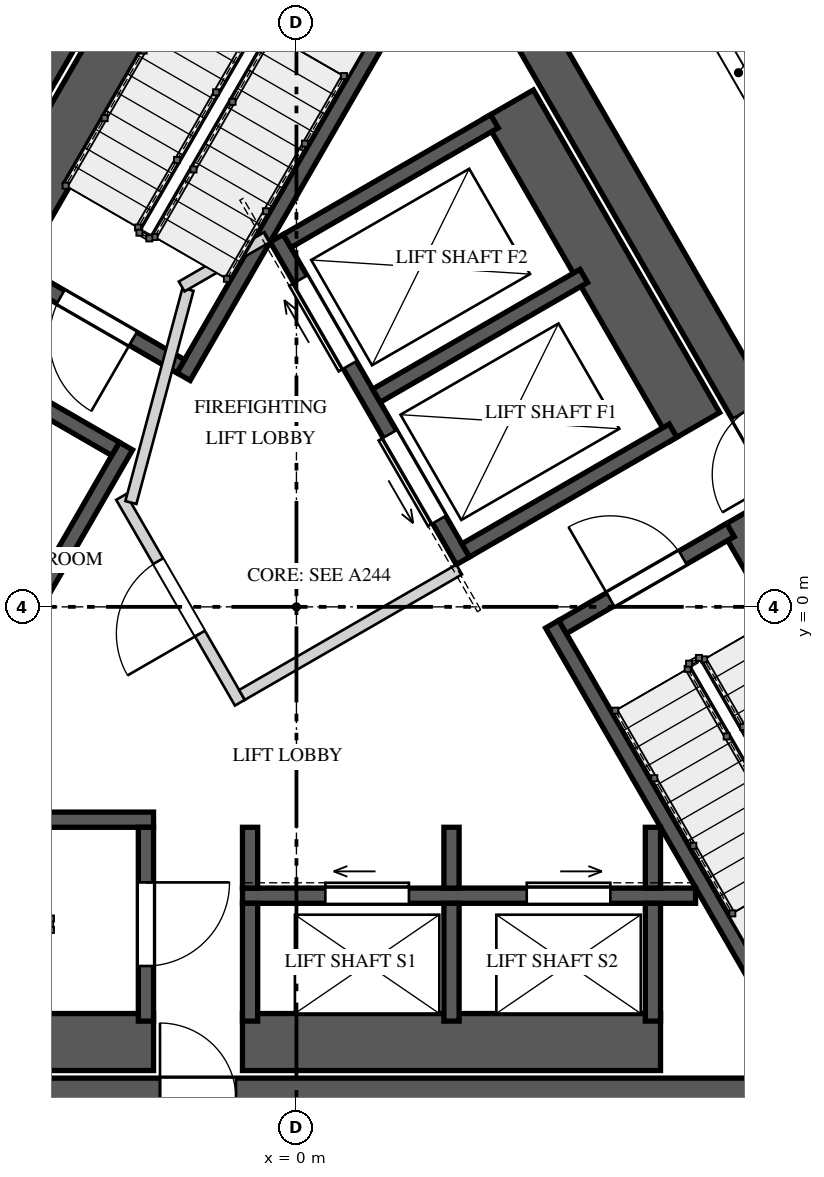
"""IFC4 building model, lengths in metres.
Left out: names, types, materials, properties, quantities, classifications, styles, units other than length and angle.
Written with IfcOpenShell. Run it as: python <this file> out.ifc"""

import sys

from ifc_helpers import new_model, si_unit, direction, frame, frame_2d, origin, place, context, subcontext, project, spatial, polyline, rectangle, outline, extrude, element, fill, save


model = new_model("IFC4")
c1 = context("Model", 3, precision=1e-05, world=origin(), true_north=direction((0.0, 1.0)))
c2 = subcontext(c1, "Body", "Model", "MODEL_VIEW")
j1 = project(units=[si_unit("LENGTHUNIT", "METRE"), si_unit("PLANEANGLEUNIT", "RADIAN")], contexts=[c1])
p1 = place(None, origin())
s1 = spatial("IfcSite", under=j1, at=p1, CompositionType="ELEMENT")
p2 = place(p1, origin())
s2 = spatial("IfcBuilding", under=s1, at=p2, CompositionType="ELEMENT")
p3 = place(p2, frame((0.0, 0.0, 348.4)))
s3 = spatial("IfcBuildingStorey", under=s2, at=p3, CompositionType="ELEMENT", Elevation=348.4)
p4 = place(p3, frame((-1.285, 10.725, 0.0), z_axis=(0.0, 0.0, 1.0), x_axis=(-0.499994590896, -0.86602852671, 0.0)))
e1 = element("IfcWall", 1, at=p4, inside=s3, PredefinedType="SHEAR", context=c2, shape_type="SweptSolid", body=[
    extrude(rectangle(XDim=17.292, YDim=0.55, at=frame_2d((8.646, 0.0))), origin(), (0.0, 0.0, 1.0), 4.0),
])
p5 = place(p4, frame((6.851, 0.0, 0.0)))
e2 = element("IfcOpeningElement", 2, at=p5, cuts=e1, PredefinedType="OPENING", context=c2, shape_type="SweptSolid", body=[
    extrude(rectangle(XDim=1.0, YDim=2.4, at=frame_2d((0.5, 1.2))), frame((0.0, 0.285, 0.0), z_axis=(0.0, -1.0, 0.0), x_axis=(1.0, 0.0, 0.0)), (0.0, 0.0, 1.0), 0.57),
])
p6 = place(p4, frame((15.089, 0.0, 0.0)))
e3 = element("IfcOpeningElement", 3, at=p6, cuts=e1, PredefinedType="OPENING", context=c2, shape_type="SweptSolid", body=[
    extrude(rectangle(XDim=0.8, YDim=2.1, at=frame_2d((0.4, 1.05))), frame((0.0, 0.285, 0.0), z_axis=(0.0, -1.0, 0.0), x_axis=(1.0, 0.0, 0.0)), (0.0, 0.0, 1.0), 0.57),
])
p7 = place(p3, frame((-8.646, -6.475, 0.0), z_axis=(0.0, 0.0, 1.0), x_axis=(1.0, 0.0, 0.0)))
e4 = element("IfcWall", 4, at=p7, inside=s3, PredefinedType="SHEAR", context=c2, shape_type="SweptSolid", body=[
    extrude(rectangle(XDim=17.292, YDim=0.55, at=frame_2d((8.646, 0.0))), origin(), (0.0, 0.0, 1.0), 4.0),
])
p8 = place(p7, frame((6.851, 0.0, 0.0)))
e5 = element("IfcOpeningElement", 5, at=p8, cuts=e4, PredefinedType="OPENING", context=c2, shape_type="SweptSolid", body=[
    extrude(rectangle(XDim=1.0, YDim=2.4, at=frame_2d((0.5, 1.2))), frame((0.0, 0.285, 0.0), z_axis=(0.0, -1.0, 0.0), x_axis=(1.0, 0.0, 0.0)), (0.0, 0.0, 1.0), 0.57),
])
p9 = place(p7, frame((15.089, 0.0, 0.0)))
e6 = element("IfcOpeningElement", 6, at=p9, cuts=e4, PredefinedType="OPENING", context=c2, shape_type="SweptSolid", body=[
    extrude(rectangle(XDim=0.8, YDim=2.1, at=frame_2d((0.4, 1.05))), frame((0.0, 0.285, 0.0), z_axis=(0.0, -1.0, 0.0), x_axis=(1.0, 0.0, 0.0)), (0.0, 0.0, 1.0), 0.57),
])
p10 = place(p3, frame((9.93, -4.25, 0.0), z_axis=(0.0, 0.0, 1.0), x_axis=(-0.499994590896, 0.86602852671, 0.0)))
e7 = element("IfcWall", 7, at=p10, inside=s3, PredefinedType="SHEAR", context=c2, shape_type="SweptSolid", body=[
    extrude(rectangle(XDim=17.292, YDim=0.55, at=frame_2d((8.646, 0.0))), origin(), (0.0, 0.0, 1.0), 4.0),
])
p11 = place(p10, frame((6.921, 0.0, 0.0)))
e8 = element("IfcOpeningElement", 8, at=p11, cuts=e7, PredefinedType="OPENING", context=c2, shape_type="SweptSolid", body=[
    extrude(rectangle(XDim=1.0, YDim=2.4, at=frame_2d((0.5, 1.2))), frame((0.0, 0.285, 0.0), z_axis=(0.0, -1.0, 0.0), x_axis=(1.0, 0.0, 0.0)), (0.0, 0.0, 1.0), 0.57),
])
p12 = place(p3, frame((-0.918, 9.86, 0.0), z_axis=(0.0, 0.0, 1.0), x_axis=(-0.500026960575, -0.86600983753, 0.0)))
e9 = element("IfcWall", 9, at=p12, inside=s3, PredefinedType="SOLIDWALL", context=c2, shape_type="SweptSolid", body=[
    extrude(rectangle(XDim=6.2, YDim=0.75, at=frame_2d((3.1, 0.0))), origin(), (0.0, 0.0, 1.0), 3.65),
])
p13 = place(p3, frame((1.615, 8.397, 0.0), z_axis=(0.0, 0.0, 1.0), x_axis=(-0.500009909098, -0.866019682689, 0.0)))
e10 = element("IfcWall", 10, at=p13, inside=s3, PredefinedType="SOLIDWALL", context=c2, shape_type="SweptSolid", body=[
    extrude(rectangle(XDim=6.2, YDim=0.2, at=frame_2d((3.1, 0.0))), origin(), (0.0, 0.0, 1.0), 3.65),
])
p14 = place(p3, frame((-1.521, 3.165, 0.0), z_axis=(0.0, 0.0, 1.0), x_axis=(-0.866030925526, 0.499990435942, 0.0)))
e11 = element("IfcWall", 11, at=p14, inside=s3, PredefinedType="SOLIDWALL", context=c2, shape_type="SweptSolid", body=[
    extrude(rectangle(XDim=2.55, YDim=0.2, at=frame_2d((1.275, 0.0))), origin(), (0.0, 0.0, 1.0), 3.65),
])
p15 = place(p14, frame((0.725, 0.0, 0.0)))
e12 = element("IfcOpeningElement", 12, at=p15, cuts=e11, PredefinedType="OPENING", context=c2, shape_type="SweptSolid", body=[
    extrude(rectangle(XDim=1.1, YDim=2.4, at=frame_2d((0.55, 1.2))), frame((0.0, 0.11, 0.0), z_axis=(0.0, -1.0, 0.0), x_axis=(1.0, 0.0, 0.0)), (0.0, 0.0, 1.0), 0.22),
])
p16 = place(p3, frame((-8.08, -5.725, 0.0), z_axis=(0.0, 0.0, 1.0), x_axis=(1.0, 0.0, 0.0)))
e13 = element("IfcWall", 13, at=p16, inside=s3, PredefinedType="SOLIDWALL", context=c2, shape_type="SweptSolid", body=[
    extrude(rectangle(XDim=6.2, YDim=0.75, at=frame_2d((3.1, 0.0))), origin(), (0.0, 0.0, 1.0), 3.65),
])
p17 = place(p3, frame((-8.08, -2.8, 0.0), z_axis=(0.0, 0.0, 1.0), x_axis=(1.0, 0.0, 0.0)))
e14 = element("IfcWall", 14, at=p17, inside=s3, PredefinedType="SOLIDWALL", context=c2, shape_type="SweptSolid", body=[
    extrude(rectangle(XDim=6.2, YDim=0.2, at=frame_2d((3.1, 0.0))), origin(), (0.0, 0.0, 1.0), 3.65),
])
p18 = place(p3, frame((-1.98, -2.9, 0.0), z_axis=(0.0, 0.0, 1.0), x_axis=(0.0, -1.0, 0.0)))
e15 = element("IfcWall", 15, at=p18, inside=s3, PredefinedType="SOLIDWALL", context=c2, shape_type="SweptSolid", body=[
    extrude(rectangle(XDim=2.55, YDim=0.2, at=frame_2d((1.275, 0.0))), origin(), (0.0, 0.0, 1.0), 3.65),
])
p19 = place(p18, frame((0.725, 0.0, 0.0)))
e16 = element("IfcOpeningElement", 16, at=p19, cuts=e15, PredefinedType="OPENING", context=c2, shape_type="SweptSolid", body=[
    extrude(rectangle(XDim=1.1, YDim=2.4, at=frame_2d((0.55, 1.2))), frame((0.0, 0.11, 0.0), z_axis=(0.0, -1.0, 0.0), x_axis=(1.0, 0.0, 0.0)), (0.0, 0.0, 1.0), 0.22),
])
p20 = place(p3, frame((8.998, -4.135, 0.0), z_axis=(0.0, 0.0, 1.0), x_axis=(-0.500009909098, 0.866019682689, 0.0)))
e17 = element("IfcWall", 17, at=p20, inside=s3, PredefinedType="SOLIDWALL", context=c2, shape_type="SweptSolid", body=[
    extrude(rectangle(XDim=6.2, YDim=0.75, at=frame_2d((3.1, 0.0))), origin(), (0.0, 0.0, 1.0), 3.65),
])
p21 = place(p3, frame((6.465, -5.597, 0.0), z_axis=(0.0, 0.0, 1.0), x_axis=(-0.49998037582, 0.866036733513, 0.0)))
e18 = element("IfcWall", 18, at=p21, inside=s3, PredefinedType="SOLIDWALL", context=c2, shape_type="SweptSolid", body=[
    extrude(rectangle(XDim=6.2, YDim=0.2, at=frame_2d((3.1, 0.0))), origin(), (0.0, 0.0, 1.0), 3.65),
])
p22 = place(p3, frame((3.501, -0.265, 0.0), z_axis=(0.0, 0.0, 1.0), x_axis=(0.866030925526, 0.499990435942, 0.0)))
e19 = element("IfcWall", 19, at=p22, inside=s3, PredefinedType="SOLIDWALL", context=c2, shape_type="SweptSolid", body=[
    extrude(rectangle(XDim=2.55, YDim=0.2, at=frame_2d((1.275, 0.0))), origin(), (0.0, 0.0, 1.0), 3.65),
])
p23 = place(p22, frame((0.725, 0.0, 0.0)))
e20 = element("IfcOpeningElement", 20, at=p23, cuts=e19, PredefinedType="OPENING", context=c2, shape_type="SweptSolid", body=[
    extrude(rectangle(XDim=1.1, YDim=2.4, at=frame_2d((0.55, 1.2))), frame((0.0, 0.11, 0.0), z_axis=(0.0, -1.0, 0.0), x_axis=(1.0, 0.0, 0.0)), (0.0, 0.0, 1.0), 0.22),
])
p24 = place(p3, frame((-4.993, -2.648, 0.0), z_axis=(0.0, 0.0, 1.0), x_axis=(0.499996545922, 0.866027397988, 0.0)))
e21 = element("IfcWall", 21, at=p24, inside=s3, PredefinedType="SOLIDWALL", context=c2, shape_type="SweptSolid", body=[
    extrude(rectangle(XDim=5.5, YDim=0.2, at=frame_2d((2.75, 0.0))), origin(), (0.0, 0.0, 1.0), 3.65),
])
p25 = place(p24, frame((2.275, 0.0, 0.0)))
e22 = element("IfcOpeningElement", 22, at=p25, cuts=e21, PredefinedType="OPENING", context=c2, shape_type="SweptSolid", body=[
    extrude(rectangle(XDim=0.95, YDim=2.4, at=frame_2d((0.475, 1.2))), frame((0.0, 0.11, 0.0), z_axis=(0.0, -1.0, 0.0), x_axis=(1.0, 0.0, 0.0)), (0.0, 0.0, 1.0), 0.22),
])
p26 = place(p3, frame((-2.38, 2.078, 0.0), z_axis=(0.0, 0.0, 1.0), x_axis=(-0.866061024631, 0.499938297808, 0.0)))
e23 = element("IfcWall", 23, at=p26, inside=s3, PredefinedType="SOLIDWALL", context=c2, shape_type="SweptSolid", body=[
    extrude(rectangle(XDim=2.35, YDim=0.2, at=frame_2d((1.175, 0.0))), origin(), (0.0, 0.0, 1.0), 3.65),
])
p27 = place(p3, frame((-0.71, -3.8, 0.0), z_axis=(0.0, 0.0, 1.0), x_axis=(1.0, 0.0, 0.0)))
e24 = element("IfcWall", 24, at=p27, inside=s3, PredefinedType="SOLIDWALL", context=c2, shape_type="SweptSolid", body=[
    extrude(rectangle(XDim=5.961, YDim=0.2, at=frame_2d((2.981, 0.0))), origin(), (0.0, 0.0, 1.0), 3.65),
])
p28 = place(p27, frame((1.09, 0.0, 0.0)))
e25 = element("IfcOpeningElement", 25, at=p28, cuts=e24, PredefinedType="OPENING", context=c2, shape_type="SweptSolid", body=[
    extrude(rectangle(XDim=1.1, YDim=2.1, at=frame_2d((0.55, 1.05))), frame((0.0, 0.11, 0.0), z_axis=(0.0, -1.0, 0.0), x_axis=(1.0, 0.0, 0.0)), (0.0, 0.0, 1.0), 0.22),
])
p29 = place(p27, frame((3.74, 0.0, 0.0)))
e26 = element("IfcOpeningElement", 26, at=p29, cuts=e24, PredefinedType="OPENING", context=c2, shape_type="SweptSolid", body=[
    extrude(rectangle(XDim=1.1, YDim=2.1, at=frame_2d((0.55, 1.05))), frame((0.0, 0.11, 0.0), z_axis=(0.0, -1.0, 0.0), x_axis=(1.0, 0.0, 0.0)), (0.0, 0.0, 1.0), 0.22),
])
p30 = place(p3, frame((-0.71, -5.725, 0.0), z_axis=(0.0, 0.0, 1.0), x_axis=(1.0, 0.0, 0.0)))
e27 = element("IfcWall", 27, at=p30, inside=s3, PredefinedType="SOLIDWALL", context=c2, shape_type="SweptSolid", body=[
    extrude(rectangle(XDim=5.5, YDim=0.75, at=frame_2d((2.75, 0.0))), origin(), (0.0, 0.0, 1.0), 3.65),
])
p31 = place(p3, frame((-0.61, -3.9, 0.0), z_axis=(0.0, 0.0, 1.0), x_axis=(0.0, -1.0, 0.0)))
e28 = element("IfcWall", 28, at=p31, inside=s3, PredefinedType="SOLIDWALL", context=c2, shape_type="SweptSolid", body=[
    extrude(rectangle(XDim=1.55, YDim=0.2, at=frame_2d((0.775, 0.0))), origin(), (0.0, 0.0, 1.0), 3.65),
])
p32 = place(p3, frame((-0.61, -2.9, 0.0), z_axis=(0.0, 0.0, 1.0), x_axis=(0.0, -1.0, 0.0)))
e29 = element("IfcWall", 29, at=p32, inside=s3, PredefinedType="SOLIDWALL", context=c2, shape_type="SweptSolid", body=[
    extrude(rectangle(XDim=0.8, YDim=0.2, at=frame_2d((0.4, 0.0))), origin(), (0.0, 0.0, 1.0), 3.65),
])
p33 = place(p3, frame((2.04, -3.9, 0.0), z_axis=(0.0, 0.0, 1.0), x_axis=(0.0, -1.0, 0.0)))
e30 = element("IfcWall", 30, at=p33, inside=s3, PredefinedType="SOLIDWALL", context=c2, shape_type="SweptSolid", body=[
    extrude(rectangle(XDim=1.55, YDim=0.2, at=frame_2d((0.775, 0.0))), origin(), (0.0, 0.0, 1.0), 3.65),
])
p34 = place(p3, frame((2.04, -2.9, 0.0), z_axis=(0.0, 0.0, 1.0), x_axis=(0.0, -1.0, 0.0)))
e31 = element("IfcWall", 31, at=p34, inside=s3, PredefinedType="SOLIDWALL", context=c2, shape_type="SweptSolid", body=[
    extrude(rectangle(XDim=0.8, YDim=0.2, at=frame_2d((0.4, 0.0))), origin(), (0.0, 0.0, 1.0), 3.65),
])
p35 = place(p3, frame((4.69, -3.9, 0.0), z_axis=(0.0, 0.0, 1.0), x_axis=(0.0, -1.0, 0.0)))
e32 = element("IfcWall", 32, at=p35, inside=s3, PredefinedType="SOLIDWALL", context=c2, shape_type="SweptSolid", body=[
    extrude(rectangle(XDim=1.55, YDim=0.2, at=frame_2d((0.775, 0.0))), origin(), (0.0, 0.0, 1.0), 3.65),
])
p36 = place(p3, frame((4.69, -2.9, 0.0), z_axis=(0.0, 0.0, 1.0), x_axis=(0.0, -1.0, 0.0)))
e33 = element("IfcWall", 33, at=p36, inside=s3, PredefinedType="SOLIDWALL", context=c2, shape_type="SweptSolid", body=[
    extrude(rectangle(XDim=0.8, YDim=0.2, at=frame_2d((0.4, 0.0))), origin(), (0.0, 0.0, 1.0), 3.65),
])
p37 = place(p3, frame((2.19, 0.606, 0.0), z_axis=(0.0, 0.0, 1.0), x_axis=(-0.500002801628, 0.866023786258, 0.0)))
e34 = element("IfcWall", 34, at=p37, inside=s3, PredefinedType="SOLIDWALL", context=c2, shape_type="SweptSolid", body=[
    extrude(rectangle(XDim=4.9, YDim=0.2, at=frame_2d((2.45, 0.0))), origin(), (0.0, 0.0, 1.0), 3.65),
])
p38 = place(p37, frame((0.625, 0.0, 0.0)))
e35 = element("IfcOpeningElement", 35, at=p38, cuts=e34, PredefinedType="OPENING", context=c2, shape_type="SweptSolid", body=[
    extrude(rectangle(XDim=1.3, YDim=2.1, at=frame_2d((0.65, 1.05))), frame((0.0, 0.11, 0.0), z_axis=(0.0, -1.0, 0.0), x_axis=(1.0, 0.0, 0.0)), (0.0, 0.0, 1.0), 0.22),
])
p39 = place(p37, frame((2.975, 0.0, 0.0)))
e36 = element("IfcOpeningElement", 36, at=p39, cuts=e34, PredefinedType="OPENING", context=c2, shape_type="SweptSolid", body=[
    extrude(rectangle(XDim=1.3, YDim=2.1, at=frame_2d((0.65, 1.05))), frame((0.0, 0.11, 0.0), z_axis=(0.0, -1.0, 0.0), x_axis=(1.0, 0.0, 0.0)), (0.0, 0.0, 1.0), 0.22),
])
p40 = place(p3, frame((5.243, 2.369, 0.0), z_axis=(0.0, 0.0, 1.0), x_axis=(-0.500002801628, 0.866023786258, 0.0)))
e37 = element("IfcWall", 37, at=p40, inside=s3, PredefinedType="SOLIDWALL", context=c2, shape_type="SweptSolid", body=[
    extrude(rectangle(XDim=4.9, YDim=0.75, at=frame_2d((2.45, 0.0))), origin(), (0.0, 0.0, 1.0), 3.65),
])
for number, where, z_axis, x_axis in (
    (38, (2.227, 0.743, 0.0), (0.0, 0.0, 1.0), (0.866, 0.5, 0.0)),
    (39, (1.052, 2.778, 0.0), (0.0, 0.0, 1.0), (0.866, 0.5, 0.0)),
    (40, (-0.123, 4.813, 0.0), (0.0, 0.0, 1.0), (0.866, 0.5, 0.0)),
):
    element("IfcWall", number, at=place(p3, frame(where, z_axis=z_axis, x_axis=x_axis)), inside=s3, PredefinedType="SOLIDWALL", context=c2, shape_type="SweptSolid", body=[
        extrude(rectangle(XDim=3.15, YDim=0.2, at=frame_2d((1.575, 0.0))), origin(), (0.0, 0.0, 1.0), 3.65),
    ])
p41 = place(p3, frame((-0.744, -1.261, 0.0), z_axis=(0.0, 0.0, 1.0), x_axis=(-0.500004234368, 0.866022959057, 0.0)))
e41 = element("IfcWall", 41, at=p41, inside=s3, PredefinedType="PARTITIONING", context=c2, shape_type="SweptSolid", body=[
    extrude(rectangle(XDim=3.125, YDim=0.15, at=frame_2d((1.562, 0.0))), origin(), (0.0, 0.0, 1.0), 3.65),
])
p42 = place(p41, frame((1.05, 0.0, 0.0)))
e42 = element("IfcOpeningElement", 42, at=p42, cuts=e41, PredefinedType="OPENING", context=c2, shape_type="SweptSolid", body=[
    extrude(rectangle(XDim=1.1, YDim=2.4, at=frame_2d((0.55, 1.2))), frame((0.0, 0.085, 0.0), z_axis=(0.0, -1.0, 0.0), x_axis=(1.0, 0.0, 0.0)), (0.0, 0.0, 1.0), 0.17),
])
p43 = place(p3, frame((-0.717, -1.159, 0.0), z_axis=(0.0, 0.0, 1.0), x_axis=(0.866008176907, 0.50002983664, 0.0)))
e43 = element("IfcWall", 43, at=p43, inside=s3, PredefinedType="PARTITIONING", context=c2, shape_type="SweptSolid", body=[
    extrude(rectangle(XDim=3.3, YDim=0.15, at=frame_2d((1.65, 0.0))), origin(), (0.0, 0.0, 1.0), 3.65),
])
p44 = place(p3, frame((-2.178, 1.372, 0.0), z_axis=(0.0, 0.0, 1.0), x_axis=(0.258808958833, 0.96592852884, 0.0)))
e44 = element("IfcWall", 44, at=p44, inside=s3, PredefinedType="PARTITIONING", context=c2, shape_type="SweptSolid", body=[
    extrude(rectangle(XDim=2.903, YDim=0.15, at=frame_2d((1.451, 0.0))), origin(), (0.0, 0.0, 1.0), 3.65),
])
p45 = place(p3, frame((-1.51, 4.215, 0.0), z_axis=(0.0, 0.0, 1.0), x_axis=(0.866085525409, 0.49989585183, 0.0)))
e45 = element("IfcWall", 45, at=p45, inside=s3, PredefinedType="PARTITIONING", context=c2, shape_type="SweptSolid", body=[
    extrude(rectangle(XDim=1.3, YDim=0.15, at=frame_2d((0.65, 0.0))), origin(), (0.0, 0.0, 1.0), 3.65),
])
p46 = place(p3, frame((5.515, 7.547, 0.0), z_axis=(0.0, 0.0, 1.0), x_axis=(0.499986163319, -0.866033392248, 0.0)))
e46 = element("IfcWall", 46, at=p46, inside=s3, PredefinedType="SOLIDWALL", context=c2, shape_type="SweptSolid", body=[
    extrude(outline(polyline([(0.0, 0.0), (1.549, 0.0), (1.549, 2.55), (0.605, 2.55), (0.605, 3.65), (0.0, 3.65), (0.0, 0.0)])), frame((0.0, 0.1, 0.0), z_axis=(0.0, -1.0, 0.0), x_axis=(1.0, 0.0, 0.0)), (0.0, 0.0, 1.0), 0.2),
])
p47 = place(p46, frame((0.05, 0.0, 0.0)))
e47 = element("IfcOpeningElement", 47, at=p47, cuts=e46, PredefinedType="OPENING", context=c2, shape_type="SweptSolid", body=[
    extrude(rectangle(XDim=1.1, YDim=2.4, at=frame_2d((0.55, 1.2))), frame((0.0, 0.11, 0.0), z_axis=(0.0, -1.0, 0.0), x_axis=(1.0, 0.0, 0.0)), (0.0, 0.0, 1.0), 0.22),
])
p48 = place(p15, origin())
e48 = element("IfcDoor", 48, at=p48, inside=s3, OperationType="SINGLE_SWING_RIGHT", PredefinedType="DOOR", context=c2, shape_type="SweptSolid", body=[
    extrude(rectangle(XDim=1.1, YDim=2.4, at=frame_2d((0.55, 1.2))), frame((0.0, 0.025, 0.0), z_axis=(0.0, -1.0, 0.0), x_axis=(1.0, 0.0, 0.0)), (0.0, 0.0, 1.0), 0.05),
])
fill(e12, e48)
p49 = place(p19, origin())
e49 = element("IfcDoor", 49, at=p49, inside=s3, OperationType="SINGLE_SWING_LEFT", PredefinedType="DOOR", context=c2, shape_type="SweptSolid", body=[
    extrude(rectangle(XDim=1.1, YDim=2.4, at=frame_2d((0.55, 1.2))), frame((0.0, 0.025, 0.0), z_axis=(0.0, -1.0, 0.0), x_axis=(1.0, 0.0, 0.0)), (0.0, 0.0, 1.0), 0.05),
])
fill(e16, e49)
p50 = place(p23, origin())
e50 = element("IfcDoor", 50, at=p50, inside=s3, OperationType="SINGLE_SWING_RIGHT", PredefinedType="DOOR", context=c2, shape_type="SweptSolid", body=[
    extrude(rectangle(XDim=1.1, YDim=2.4, at=frame_2d((0.55, 1.2))), frame((0.0, 0.025, 0.0), z_axis=(0.0, -1.0, 0.0), x_axis=(1.0, 0.0, 0.0)), (0.0, 0.0, 1.0), 0.05),
])
fill(e20, e50)
p51 = place(p28, origin())
e51 = element("IfcDoor", 51, at=p51, inside=s3, OperationType="SLIDING_TO_LEFT", PredefinedType="DOOR", context=c2, shape_type="SweptSolid", body=[
    extrude(rectangle(XDim=1.1, YDim=2.1, at=frame_2d((0.55, 1.05))), frame((0.0, 0.025, 0.0), z_axis=(0.0, -1.0, 0.0), x_axis=(1.0, 0.0, 0.0)), (0.0, 0.0, 1.0), 0.05),
])
fill(e25, e51)
p52 = place(p29, origin())
e52 = element("IfcDoor", 52, at=p52, inside=s3, OperationType="SLIDING_TO_RIGHT", PredefinedType="DOOR", context=c2, shape_type="SweptSolid", body=[
    extrude(rectangle(XDim=1.1, YDim=2.1, at=frame_2d((0.55, 1.05))), frame((0.0, 0.025, 0.0), z_axis=(0.0, -1.0, 0.0), x_axis=(1.0, 0.0, 0.0)), (0.0, 0.0, 1.0), 0.05),
])
fill(e26, e52)
p53 = place(p38, origin())
e53 = element("IfcDoor", 53, at=p53, inside=s3, OperationType="SLIDING_TO_LEFT", PredefinedType="DOOR", context=c2, shape_type="SweptSolid", body=[
    extrude(rectangle(XDim=1.3, YDim=2.1, at=frame_2d((0.65, 1.05))), frame((0.0, 0.025, 0.0), z_axis=(0.0, -1.0, 0.0), x_axis=(1.0, 0.0, 0.0)), (0.0, 0.0, 1.0), 0.05),
])
fill(e35, e53)
p54 = place(p39, origin())
e54 = element("IfcDoor", 54, at=p54, inside=s3, OperationType="SLIDING_TO_RIGHT", PredefinedType="DOOR", context=c2, shape_type="SweptSolid", body=[
    extrude(rectangle(XDim=1.3, YDim=2.1, at=frame_2d((0.65, 1.05))), frame((0.0, 0.025, 0.0), z_axis=(0.0, -1.0, 0.0), x_axis=(1.0, 0.0, 0.0)), (0.0, 0.0, 1.0), 0.05),
])
fill(e36, e54)
p55 = place(p42, origin())
e55 = element("IfcDoor", 55, at=p55, inside=s3, OperationType="SINGLE_SWING_LEFT", PredefinedType="DOOR", context=c2, shape_type="SweptSolid", body=[
    extrude(rectangle(XDim=1.1, YDim=2.4, at=frame_2d((0.55, 1.2))), frame((0.0, 0.025, 0.0), z_axis=(0.0, -1.0, 0.0), x_axis=(1.0, 0.0, 0.0)), (0.0, 0.0, 1.0), 0.05),
])
fill(e42, e55)
p56 = place(p47, origin())
e56 = element("IfcDoor", 56, at=p56, inside=s3, OperationType="SINGLE_SWING_LEFT", PredefinedType="DOOR", context=c2, shape_type="SweptSolid", body=[
    extrude(rectangle(XDim=1.1, YDim=2.4, at=frame_2d((0.55, 1.2))), frame((0.0, 0.025, 0.0), z_axis=(0.0, -1.0, 0.0), x_axis=(1.0, 0.0, 0.0)), (0.0, 0.0, 1.0), 0.05),
])
fill(e47, e56)
save(model, sys.argv[1])
